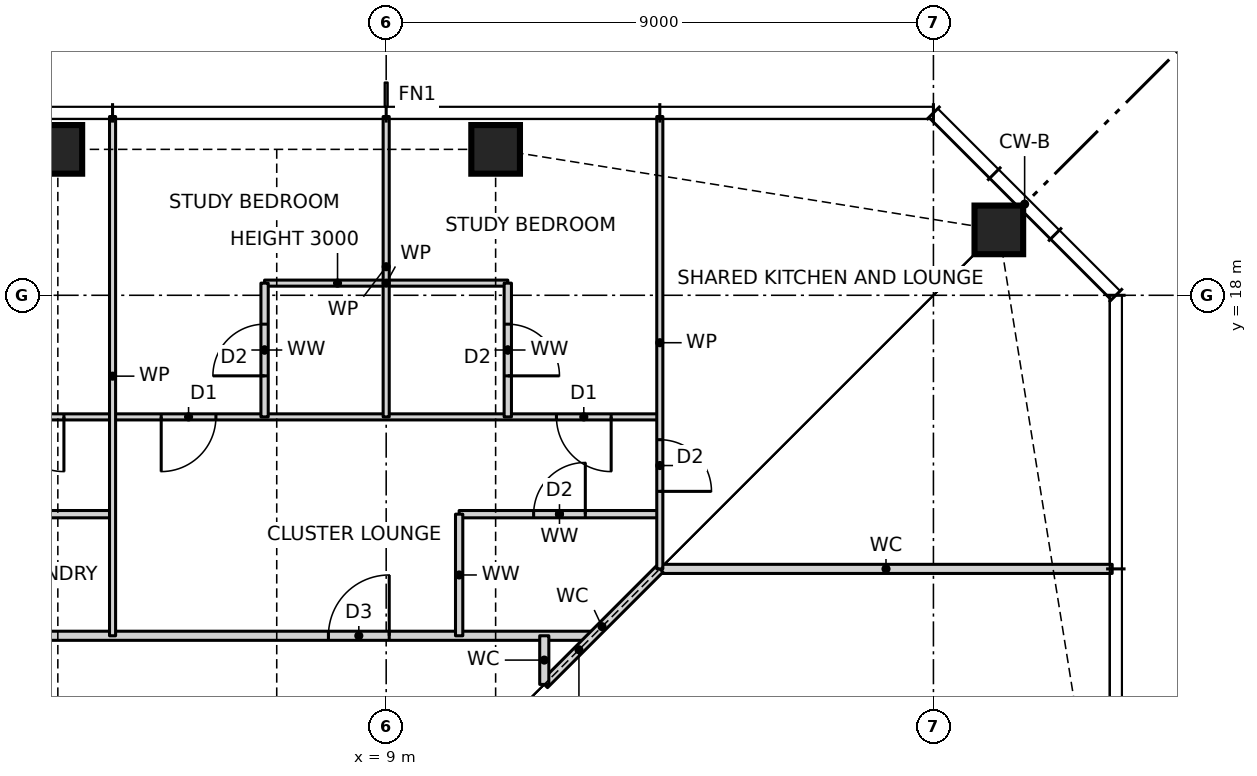
"""IFC4 building model, lengths in metres.
Left out: names, types, materials, properties, quantities, classifications, styles, units other than length and angle.
Written with IfcOpenShell. Run it as: python <this file> out.ifc"""

import sys

from ifc_helpers import new_model, si_unit, direction, frame, frame_2d, origin, origin_2d, place, context, subcontext, project, spatial, rectangle, hollow_rectangle, extrude, element, fill, save


model = new_model("IFC4")
c1 = context("Model", 3, precision=1e-05, world=origin(), true_north=direction((0.0, 1.0)))
c2 = subcontext(c1, "Body", "Model", "MODEL_VIEW")
j1 = project(units=[si_unit("LENGTHUNIT", "METRE"), si_unit("PLANEANGLEUNIT", "RADIAN")], contexts=[c1])
p1 = place(None, origin())
s1 = spatial("IfcSite", under=j1, at=p1, CompositionType="ELEMENT")
p2 = place(p1, origin())
s2 = spatial("IfcBuilding", under=s1, at=p2, CompositionType="ELEMENT")
p3 = place(p2, frame((0.0, 0.0, 115.5)))
s3 = spatial("IfcBuildingStorey", under=s2, at=p3, CompositionType="ELEMENT", Elevation=115.5)
for number, where, z_axis, x_axis in (
    (1, (19.076, 19.076, 0.0), (0.0, 0.0, 1.0), (1.0, 0.0, 0.0)),
    (2, (10.8, 20.4, 0.0), (0.0, 0.0, 1.0), (1.0, 0.0, 0.0)),
    (3, (3.6, 20.4, 0.0), (0.0, 0.0, 1.0), (1.0, 0.0, 0.0)),
):
    element("IfcColumn", number, at=place(p3, frame(where, z_axis=z_axis, x_axis=x_axis)), inside=s3, PredefinedType="COLUMN", context=c2, shape_type="SweptSolid", body=[
        extrude(hollow_rectangle(XDim=0.8, YDim=0.8, WallThickness=0.07, at=origin_2d()), origin(), (0.0, 0.0, 1.0), 3.5),
    ])
p4 = place(p3, frame((-9.0, 12.4, 0.0), z_axis=(0.0, 0.0, 1.0), x_axis=(1.0, 0.0, 0.0)))
e4 = element("IfcWall", 4, at=p4, inside=s3, PredefinedType="PARTITIONING", context=c2, shape_type="SweptSolid", body=[
    extrude(rectangle(XDim=21.4, YDim=0.15, at=frame_2d((10.7, 0.0))), origin(), (0.0, 0.0, 1.0), 3.27),
])
p5 = place(p4, frame((17.05, 0.0, 0.0)))
e5 = element("IfcOpeningElement", 5, at=p5, cuts=e4, PredefinedType="OPENING", context=c2, shape_type="SweptSolid", body=[
    extrude(rectangle(XDim=1.0, YDim=2.1, at=frame_2d((0.5, 1.05))), frame((0.0, 0.085, 0.0), z_axis=(0.0, -1.0, 0.0), x_axis=(1.0, 0.0, 0.0)), (0.0, 0.0, 1.0), 0.17),
])
p6 = place(p4, frame((1.65, 0.0, 0.0)))
e6 = element("IfcOpeningElement", 6, at=p6, cuts=e4, PredefinedType="OPENING", context=c2, shape_type="SweptSolid", body=[
    extrude(rectangle(XDim=1.0, YDim=2.1, at=frame_2d((0.5, 1.05))), frame((0.0, 0.085, 0.0), z_axis=(0.0, -1.0, 0.0), x_axis=(1.0, 0.0, 0.0)), (0.0, 0.0, 1.0), 0.17),
])
p7 = place(p3, frame((13.5, 13.5, 0.0), z_axis=(0.0, 0.0, 1.0), x_axis=(1.0, 0.0, 0.0)))
e7 = element("IfcWall", 7, at=p7, inside=s3, PredefinedType="PARTITIONING", context=c2, shape_type="SweptSolid", body=[
    extrude(rectangle(XDim=7.44, YDim=0.15, at=frame_2d((3.72, 0.0))), origin(), (0.0, 0.0, 1.0), 3.27),
])
p8 = place(p3, frame((1.0, 14.4, 0.0), z_axis=(0.0, 0.0, 1.0), x_axis=(1.0, 0.0, 0.0)))
e8 = element("IfcWall", 8, at=p8, inside=s3, PredefinedType="PARTITIONING", context=c2, shape_type="SweptSolid", body=[
    extrude(rectangle(XDim=3.5, YDim=0.12, at=frame_2d((1.75, 0.0))), origin(), (0.0, 0.0, 1.0), 3.27),
])
p9 = place(p8, frame((1.325, 0.0, 0.0)))
e9 = element("IfcOpeningElement", 9, at=p9, cuts=e8, PredefinedType="OPENING", context=c2, shape_type="SweptSolid", body=[
    extrude(rectangle(XDim=0.85, YDim=2.1, at=frame_2d((0.425, 1.05))), frame((0.0, 0.07, 0.0), z_axis=(0.0, -1.0, 0.0), x_axis=(1.0, 0.0, 0.0)), (0.0, 0.0, 1.0), 0.14),
])
p10 = place(p3, frame((10.2, 14.4, 0.0), z_axis=(0.0, 0.0, 1.0), x_axis=(1.0, 0.0, 0.0)))
e10 = element("IfcWall", 10, at=p10, inside=s3, PredefinedType="PARTITIONING", context=c2, shape_type="SweptSolid", body=[
    extrude(rectangle(XDim=3.3, YDim=0.12, at=frame_2d((1.65, 0.0))), origin(), (0.0, 0.0, 1.0), 3.27),
])
p11 = place(p10, frame((1.225, 0.0, 0.0)))
e11 = element("IfcOpeningElement", 11, at=p11, cuts=e10, PredefinedType="OPENING", context=c2, shape_type="SweptSolid", body=[
    extrude(rectangle(XDim=0.85, YDim=2.1, at=frame_2d((0.425, 1.05))), frame((0.0, 0.07, 0.0), z_axis=(0.0, -1.0, 0.0), x_axis=(1.0, 0.0, 0.0)), (0.0, 0.0, 1.0), 0.14),
])
p12 = place(p3, frame((-9.0, 16.0, 0.0), z_axis=(0.0, 0.0, 1.0), x_axis=(1.0, 0.0, 0.0)))
e12 = element("IfcWall", 12, at=p12, inside=s3, PredefinedType="PARTITIONING", context=c2, shape_type="SweptSolid", body=[
    extrude(rectangle(XDim=22.5, YDim=0.1, at=frame_2d((11.25, 0.0))), origin(), (0.0, 0.0, 1.0), 3.27),
])
p13 = place(p12, frame((20.8, 0.0, 0.0)))
e13 = element("IfcOpeningElement", 13, at=p13, cuts=e12, PredefinedType="OPENING", context=c2, shape_type="SweptSolid", body=[
    extrude(rectangle(XDim=0.9, YDim=2.1, at=frame_2d((0.45, 1.05))), frame((0.0, 0.06, 0.0), z_axis=(0.0, -1.0, 0.0), x_axis=(1.0, 0.0, 0.0)), (0.0, 0.0, 1.0), 0.12),
])
p14 = place(p12, frame((14.3, 0.0, 0.0)))
e14 = element("IfcOpeningElement", 14, at=p14, cuts=e12, PredefinedType="OPENING", context=c2, shape_type="SweptSolid", body=[
    extrude(rectangle(XDim=0.9, YDim=2.1, at=frame_2d((0.45, 1.05))), frame((0.0, 0.06, 0.0), z_axis=(0.0, -1.0, 0.0), x_axis=(1.0, 0.0, 0.0)), (0.0, 0.0, 1.0), 0.12),
])
p15 = place(p12, frame((11.8, 0.0, 0.0)))
e15 = element("IfcOpeningElement", 15, at=p15, cuts=e12, PredefinedType="OPENING", context=c2, shape_type="SweptSolid", body=[
    extrude(rectangle(XDim=0.9, YDim=2.1, at=frame_2d((0.45, 1.05))), frame((0.0, 0.06, 0.0), z_axis=(0.0, -1.0, 0.0), x_axis=(1.0, 0.0, 0.0)), (0.0, 0.0, 1.0), 0.12),
])
p16 = place(p12, frame((5.3, 0.0, 0.0)))
e16 = element("IfcOpeningElement", 16, at=p16, cuts=e12, PredefinedType="OPENING", context=c2, shape_type="SweptSolid", body=[
    extrude(rectangle(XDim=0.9, YDim=2.1, at=frame_2d((0.45, 1.05))), frame((0.0, 0.06, 0.0), z_axis=(0.0, -1.0, 0.0), x_axis=(1.0, 0.0, 0.0)), (0.0, 0.0, 1.0), 0.12),
])
p17 = place(p12, frame((2.8, 0.0, 0.0)))
e17 = element("IfcOpeningElement", 17, at=p17, cuts=e12, PredefinedType="OPENING", context=c2, shape_type="SweptSolid", body=[
    extrude(rectangle(XDim=0.9, YDim=2.1, at=frame_2d((0.45, 1.05))), frame((0.0, 0.06, 0.0), z_axis=(0.0, -1.0, 0.0), x_axis=(1.0, 0.0, 0.0)), (0.0, 0.0, 1.0), 0.12),
])
p18 = place(p3, frame((7.0, 18.2, 0.0), z_axis=(0.0, 0.0, 1.0), x_axis=(1.0, 0.0, 0.0)))
e18 = element("IfcWall", 18, at=p18, inside=s3, PredefinedType="PARTITIONING", context=c2, shape_type="SweptSolid", body=[
    extrude(rectangle(XDim=4.0, YDim=0.1, at=frame_2d((2.0, 0.0))), origin(), (0.0, 0.0, 1.0), 3.0),
])
p19 = place(p3, frame((11.6, 11.6, 0.0), z_axis=(0.0, 0.0, 1.0), x_axis=(0.707106781187, 0.707106781187, 0.0)))
e19 = element("IfcWall", 19, at=p19, inside=s3, PredefinedType="PARTITIONING", context=c2, shape_type="SweptSolid", body=[
    extrude(rectangle(XDim=2.687, YDim=0.15, at=frame_2d((1.343, 0.0))), origin(), (0.0, 0.0, 1.0), 2.343),
])
p20 = place(p3, frame((13.5, 13.5, 0.0), z_axis=(0.0, 0.0, 1.0), x_axis=(0.0, 1.0, 0.0)))
e20 = element("IfcWall", 20, at=p20, inside=s3, PredefinedType="PARTITIONING", context=c2, shape_type="SweptSolid", body=[
    extrude(rectangle(XDim=7.44, YDim=0.1, at=frame_2d((3.72, 0.0))), origin(), (0.0, 0.0, 1.0), 3.27),
])
p21 = place(p20, frame((1.275, 0.0, 0.0)))
e21 = element("IfcOpeningElement", 21, at=p21, cuts=e20, PredefinedType="OPENING", context=c2, shape_type="SweptSolid", body=[
    extrude(rectangle(XDim=0.85, YDim=2.1, at=frame_2d((0.425, 1.05))), frame((0.0, 0.06, 0.0), z_axis=(0.0, -1.0, 0.0), x_axis=(1.0, 0.0, 0.0)), (0.0, 0.0, 1.0), 0.12),
])
p22 = place(p3, frame((11.6, 11.6, 0.0), z_axis=(0.0, 0.0, 1.0), x_axis=(0.0, 1.0, 0.0)))
e22 = element("IfcWall", 22, at=p22, inside=s3, PredefinedType="PARTITIONING", context=c2, shape_type="SweptSolid", body=[
    extrude(rectangle(XDim=0.8, YDim=0.15, at=frame_2d((0.4, 0.0))), origin(), (0.0, 0.0, 1.0), 3.27),
])
p23 = place(p3, frame((11.0, 16.0, 0.0), z_axis=(0.0, 0.0, 1.0), x_axis=(0.0, 1.0, 0.0)))
e23 = element("IfcWall", 23, at=p23, inside=s3, PredefinedType="PARTITIONING", context=c2, shape_type="SweptSolid", body=[
    extrude(rectangle(XDim=2.2, YDim=0.12, at=frame_2d((1.1, 0.0))), origin(), (0.0, 0.0, 1.0), 3.27),
])
p24 = place(p23, frame((0.675, 0.0, 0.0)))
e24 = element("IfcOpeningElement", 24, at=p24, cuts=e23, PredefinedType="OPENING", context=c2, shape_type="SweptSolid", body=[
    extrude(rectangle(XDim=0.85, YDim=2.1, at=frame_2d((0.425, 1.05))), frame((0.0, 0.07, 0.0), z_axis=(0.0, -1.0, 0.0), x_axis=(1.0, 0.0, 0.0)), (0.0, 0.0, 1.0), 0.14),
])
p25 = place(p3, frame((10.2, 12.4, 0.0), z_axis=(0.0, 0.0, 1.0), x_axis=(0.0, 1.0, 0.0)))
e25 = element("IfcWall", 25, at=p25, inside=s3, PredefinedType="PARTITIONING", context=c2, shape_type="SweptSolid", body=[
    extrude(rectangle(XDim=2.0, YDim=0.12, at=frame_2d((1.0, 0.0))), origin(), (0.0, 0.0, 1.0), 3.27),
])
p26 = place(p3, frame((9.0, 16.0, 0.0), z_axis=(0.0, 0.0, 1.0), x_axis=(0.0, 1.0, 0.0)))
e26 = element("IfcWall", 26, at=p26, inside=s3, PredefinedType="PARTITIONING", context=c2, shape_type="SweptSolid", body=[
    extrude(rectangle(XDim=4.94, YDim=0.1, at=frame_2d((2.47, 0.0))), origin(), (0.0, 0.0, 1.0), 3.27),
])
p27 = place(p3, frame((7.0, 16.0, 0.0), z_axis=(0.0, 0.0, 1.0), x_axis=(0.0, 1.0, 0.0)))
e27 = element("IfcWall", 27, at=p27, inside=s3, PredefinedType="PARTITIONING", context=c2, shape_type="SweptSolid", body=[
    extrude(rectangle(XDim=2.2, YDim=0.12, at=frame_2d((1.1, 0.0))), origin(), (0.0, 0.0, 1.0), 3.27),
])
p28 = place(p27, frame((0.675, 0.0, 0.0)))
e28 = element("IfcOpeningElement", 28, at=p28, cuts=e27, PredefinedType="OPENING", context=c2, shape_type="SweptSolid", body=[
    extrude(rectangle(XDim=0.85, YDim=2.1, at=frame_2d((0.425, 1.05))), frame((0.0, 0.07, 0.0), z_axis=(0.0, -1.0, 0.0), x_axis=(1.0, 0.0, 0.0)), (0.0, 0.0, 1.0), 0.14),
])
p29 = place(p3, frame((4.5, 12.4, 0.0), z_axis=(0.0, 0.0, 1.0), x_axis=(0.0, 1.0, 0.0)))
e29 = element("IfcWall", 29, at=p29, inside=s3, PredefinedType="PARTITIONING", context=c2, shape_type="SweptSolid", body=[
    extrude(rectangle(XDim=8.54, YDim=0.1, at=frame_2d((4.27, 0.0))), origin(), (0.0, 0.0, 1.0), 3.27),
])
p30 = place(p24, frame((0.85, 0.0, 0.0), z_axis=(0.0, 0.0, 1.0), x_axis=(-1.0, 0.0, 0.0)))
e30 = element("IfcDoor", 30, at=p30, inside=s3, OperationType="SINGLE_SWING_RIGHT", PredefinedType="DOOR", context=c2, shape_type="SweptSolid", body=[
    extrude(rectangle(XDim=0.85, YDim=2.1, at=frame_2d((0.425, 1.05))), frame((0.0, 0.025, 0.0), z_axis=(0.0, -1.0, 0.0), x_axis=(1.0, 0.0, 0.0)), (0.0, 0.0, 1.0), 0.05),
])
fill(e24, e30)
p31 = place(p13, frame((0.9, 0.0, 0.0), z_axis=(0.0, 0.0, 1.0), x_axis=(-1.0, 0.0, 0.0)))
e31 = element("IfcDoor", 31, at=p31, inside=s3, OperationType="SINGLE_SWING_LEFT", PredefinedType="DOOR", context=c2, shape_type="SweptSolid", body=[
    extrude(rectangle(XDim=0.9, YDim=2.1, at=frame_2d((0.45, 1.05))), frame((0.0, 0.025, 0.0), z_axis=(0.0, -1.0, 0.0), x_axis=(1.0, 0.0, 0.0)), (0.0, 0.0, 1.0), 0.05),
])
fill(e13, e31)
p32 = place(p28, origin())
e32 = element("IfcDoor", 32, at=p32, inside=s3, OperationType="SINGLE_SWING_LEFT", PredefinedType="DOOR", context=c2, shape_type="SweptSolid", body=[
    extrude(rectangle(XDim=0.85, YDim=2.1, at=frame_2d((0.425, 1.05))), frame((0.0, 0.025, 0.0), z_axis=(0.0, -1.0, 0.0), x_axis=(1.0, 0.0, 0.0)), (0.0, 0.0, 1.0), 0.05),
])
fill(e28, e32)
p33 = place(p14, frame((0.9, 0.0, 0.0), z_axis=(0.0, 0.0, 1.0), x_axis=(-1.0, 0.0, 0.0)))
e33 = element("IfcDoor", 33, at=p33, inside=s3, OperationType="SINGLE_SWING_RIGHT", PredefinedType="DOOR", context=c2, shape_type="SweptSolid", body=[
    extrude(rectangle(XDim=0.9, YDim=2.1, at=frame_2d((0.45, 1.05))), frame((0.0, 0.025, 0.0), z_axis=(0.0, -1.0, 0.0), x_axis=(1.0, 0.0, 0.0)), (0.0, 0.0, 1.0), 0.05),
])
fill(e14, e33)
p34 = place(p5, origin())
e34 = element("IfcDoor", 34, at=p34, inside=s3, OperationType="SINGLE_SWING_RIGHT", PredefinedType="DOOR", context=c2, shape_type="SweptSolid", body=[
    extrude(rectangle(XDim=1.0, YDim=2.1, at=frame_2d((0.5, 1.05))), frame((0.0, 0.025, 0.0), z_axis=(0.0, -1.0, 0.0), x_axis=(1.0, 0.0, 0.0)), (0.0, 0.0, 1.0), 0.05),
])
fill(e5, e34)
p35 = place(p11, origin())
e35 = element("IfcDoor", 35, at=p35, inside=s3, OperationType="SINGLE_SWING_RIGHT", PredefinedType="DOOR", context=c2, shape_type="SweptSolid", body=[
    extrude(rectangle(XDim=0.85, YDim=2.1, at=frame_2d((0.425, 1.05))), frame((0.0, 0.025, 0.0), z_axis=(0.0, -1.0, 0.0), x_axis=(1.0, 0.0, 0.0)), (0.0, 0.0, 1.0), 0.05),
])
fill(e11, e35)
p36 = place(p15, frame((0.9, 0.0, 0.0), z_axis=(0.0, 0.0, 1.0), x_axis=(-1.0, 0.0, 0.0)))
e36 = element("IfcDoor", 36, at=p36, inside=s3, OperationType="SINGLE_SWING_LEFT", PredefinedType="DOOR", context=c2, shape_type="SweptSolid", body=[
    extrude(rectangle(XDim=0.9, YDim=2.1, at=frame_2d((0.45, 1.05))), frame((0.0, 0.025, 0.0), z_axis=(0.0, -1.0, 0.0), x_axis=(1.0, 0.0, 0.0)), (0.0, 0.0, 1.0), 0.05),
])
fill(e15, e36)
p37 = place(p21, frame((0.85, 0.0, 0.0), z_axis=(0.0, 0.0, 1.0), x_axis=(-1.0, 0.0, 0.0)))
e37 = element("IfcDoor", 37, at=p37, inside=s3, OperationType="SINGLE_SWING_RIGHT", PredefinedType="DOOR", context=c2, shape_type="SweptSolid", body=[
    extrude(rectangle(XDim=0.85, YDim=2.1, at=frame_2d((0.425, 1.05))), frame((0.0, 0.025, 0.0), z_axis=(0.0, -1.0, 0.0), x_axis=(1.0, 0.0, 0.0)), (0.0, 0.0, 1.0), 0.05),
])
fill(e21, e37)
save(model, sys.argv[1])
